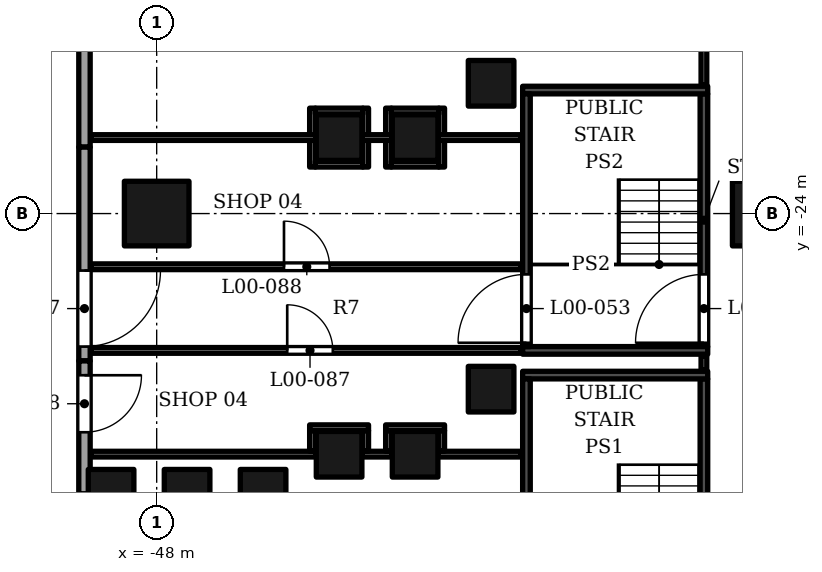
"""IFC4 building model, lengths in metres.
Left out: names, types, materials, properties, quantities, classifications, styles, units other than length and angle.
Written with IfcOpenShell. Run it as: python <this file> out.ifc"""

import sys

from ifc_helpers import new_model, si_unit, direction, frame, frame_2d, origin, origin_2d, place, context, subcontext, project, spatial, rectangle, extrude, element, fill, save


model = new_model("IFC4")
c1 = context("Model", 3, precision=1e-05, world=origin(), true_north=direction((0.0, 1.0)))
c2 = subcontext(c1, "Body", "Model", "MODEL_VIEW")
j1 = project(units=[si_unit("LENGTHUNIT", "METRE"), si_unit("PLANEANGLEUNIT", "RADIAN")], contexts=[c1])
p1 = place(None, origin())
s1 = spatial("IfcSite", under=j1, at=p1, CompositionType="ELEMENT")
p2 = place(p1, origin())
s2 = spatial("IfcBuilding", under=s1, at=p2, CompositionType="ELEMENT")
p3 = place(p2, origin())
s3 = spatial("IfcBuildingStorey", under=s2, at=p3, CompositionType="ELEMENT", Elevation=0.0)
for number, where, z_axis, x_axis in (
    (1, (-48.0, -24.0, 0.0), (0.0, 0.0, 1.0), (1.0, 0.0, 0.0)),
    (2, (-32.0, -24.0, 0.0), (0.0, 0.0, 1.0), (1.0, 0.0, 0.0)),
):
    element("IfcColumn", number, at=place(p3, frame(where, z_axis=z_axis, x_axis=x_axis)), inside=s3, PredefinedType="COLUMN", context=c2, shape_type="SweptSolid", body=[
        extrude(rectangle(XDim=1.7, YDim=1.7, at=origin_2d()), origin(), (0.0, 0.0, 1.0), 9.0),
    ])
for number, where, z_axis, x_axis in (
    (3, (-39.2, -28.62, 0.0), (0.0, 0.0, 1.0), (1.0, 0.0, 0.0)),
    (4, (-39.2, -20.572, 0.0), (0.0, 0.0, 1.0), (1.0, 0.0, 0.0)),
    (5, (-41.2, -30.333, 0.0), (0.0, 0.0, 1.0), (1.0, 0.0, 0.0)),
    (6, (-41.2, -22.001, 0.0), (0.0, 0.0, 1.0), (1.0, 0.0, 0.0)),
    (7, (-43.2, -30.333, 0.0), (0.0, 0.0, 1.0), (1.0, 0.0, 0.0)),
    (8, (-43.2, -22.001, 0.0), (0.0, 0.0, 1.0), (1.0, 0.0, 0.0)),
    (9, (-45.2, -31.333, 0.0), (0.0, 0.0, 1.0), (1.0, 0.0, 0.0)),
    (10, (-47.2, -31.333, 0.0), (0.0, 0.0, 1.0), (1.0, 0.0, 0.0)),
    (11, (-49.2, -31.333, 0.0), (0.0, 0.0, 1.0), (1.0, 0.0, 0.0)),
):
    element("IfcColumn", number, at=place(p3, frame(where, z_axis=z_axis, x_axis=x_axis)), inside=s3, PredefinedType="COLUMN", context=c2, shape_type="SweptSolid", body=[
        extrude(rectangle(XDim=1.2, YDim=1.2, at=origin_2d()), origin(), (0.0, 0.0, 1.0), 9.0),
    ])
p4 = place(p3, frame((-49.9, -13.702, 0.0), z_axis=(0.0, 0.0, 1.0), x_axis=(0.0, -1.0, 0.0)))
e12 = element("IfcWall", 12, at=p4, inside=s3, PredefinedType="ELEMENTEDWALL", context=c2, shape_type="SweptSolid", body=[
    extrude(rectangle(XDim=8.55, YDim=0.3, at=frame_2d((4.275, 0.0))), origin(), (0.0, 0.0, 1.0), 7.6),
])
p5 = place(p4, frame((2.302, 0.0, 0.0)))
e13 = element("IfcOpeningElement", 13, at=p5, cuts=e12, PredefinedType="OPENING", context=c2, shape_type="SweptSolid", body=[
    extrude(rectangle(XDim=3.0, YDim=2.7, at=frame_2d((1.5, 1.35))), frame((0.0, 0.16, 0.0), z_axis=(0.0, -1.0, 0.0), x_axis=(1.0, 0.0, 0.0)), (0.0, 0.0, 1.0), 0.32),
])
p6 = place(p3, frame((-49.9, -22.252, 0.0), z_axis=(0.0, 0.0, 1.0), x_axis=(0.0, -1.0, 0.0)))
e14 = element("IfcWall", 14, at=p6, inside=s3, PredefinedType="ELEMENTEDWALL", context=c2, shape_type="SweptSolid", body=[
    extrude(rectangle(XDim=5.625, YDim=0.3, at=frame_2d((2.812, 0.0))), origin(), (0.0, 0.0, 1.0), 7.6),
])
p7 = place(p6, frame((3.248, 0.0, 0.0)))
e15 = element("IfcOpeningElement", 15, at=p7, cuts=e14, PredefinedType="OPENING", context=c2, shape_type="SweptSolid", body=[
    extrude(rectangle(XDim=2.0, YDim=2.4, at=frame_2d((1.0, 1.2))), frame((0.0, 0.16, 0.0), z_axis=(0.0, -1.0, 0.0), x_axis=(1.0, 0.0, 0.0)), (0.0, 0.0, 1.0), 0.32),
])
p8 = place(p3, frame((-49.9, -27.877, 0.0), z_axis=(0.0, 0.0, 1.0), x_axis=(0.0, -1.0, 0.0)))
e16 = element("IfcWall", 16, at=p8, inside=s3, PredefinedType="ELEMENTEDWALL", context=c2, shape_type="SweptSolid", body=[
    extrude(rectangle(XDim=3.5, YDim=0.3, at=frame_2d((1.75, 0.0))), origin(), (0.0, 0.0, 1.0), 7.6),
])
p9 = place(p8, frame((0.377, 0.0, 0.0)))
e17 = element("IfcOpeningElement", 17, at=p9, cuts=e16, PredefinedType="OPENING", context=c2, shape_type="SweptSolid", body=[
    extrude(rectangle(XDim=1.5, YDim=2.7, at=frame_2d((0.75, 1.35))), frame((0.0, 0.16, 0.0), z_axis=(0.0, -1.0, 0.0), x_axis=(1.0, 0.0, 0.0)), (0.0, 0.0, 1.0), 0.32),
])
for number, where, z_axis, x_axis in (
    (18, (-49.85, -10.605, 9.0), (0.0, 0.0, 1.0), (0.0, -1.0, 0.0)),
    (19, (-49.85, -25.302, 9.0), (0.0, 0.0, 1.0), (0.0, -1.0, 0.0)),
):
    element("IfcWall", number, at=place(p3, frame(where, z_axis=z_axis, x_axis=x_axis)), inside=s3, PredefinedType="PARAPET", context=c2, shape_type="SweptSolid", body=[
        extrude(rectangle(XDim=14.698, YDim=0.3, at=frame_2d((7.349, 0.0))), origin(), (0.0, 0.0, 1.0), 1.1),
    ])
p10 = place(p3, frame((-38.37, -28.25, 0.0), z_axis=(0.0, 0.0, 1.0), x_axis=(1.0, 0.0, 0.0)))
e20 = element("IfcWall", 20, at=p10, inside=s3, PredefinedType="SOLIDWALL", context=c2, shape_type="SweptSolid", body=[
    extrude(rectangle(XDim=4.87, YDim=0.2, at=frame_2d((2.435, 0.0))), origin(), (0.0, 0.0, 1.0), 8.5),
])
p11 = place(p3, frame((-38.27, -35.0, 0.0), z_axis=(0.0, 0.0, 1.0), x_axis=(0.0, 1.0, 0.0)))
e21 = element("IfcWall", 21, at=p11, inside=s3, PredefinedType="SOLIDWALL", context=c2, shape_type="SweptSolid", body=[
    extrude(rectangle(XDim=6.65, YDim=0.2, at=frame_2d((3.325, 0.0))), origin(), (0.0, 0.0, 1.0), 8.5),
])
p12 = place(p11, frame((0.1, 0.0, 0.0)))
e22 = element("IfcOpeningElement", 22, at=p12, cuts=e21, PredefinedType="OPENING", context=c2, shape_type="SweptSolid", body=[
    extrude(rectangle(XDim=1.8, YDim=2.4, at=frame_2d((0.9, 1.2))), frame((0.0, 0.11, 0.0), z_axis=(0.0, -1.0, 0.0), x_axis=(1.0, 0.0, 0.0)), (0.0, 0.0, 1.0), 0.22),
])
p13 = place(p3, frame((-33.6, -35.0, 0.0), z_axis=(0.0, 0.0, 1.0), x_axis=(0.0, 1.0, 0.0)))
e23 = element("IfcWall", 23, at=p13, inside=s3, PredefinedType="SOLIDWALL", context=c2, shape_type="SweptSolid", body=[
    extrude(rectangle(XDim=6.65, YDim=0.2, at=frame_2d((3.325, 0.0))), origin(), (0.0, 0.0, 1.0), 8.5),
])
p14 = place(p13, frame((0.1, 0.0, 0.0)))
e24 = element("IfcOpeningElement", 24, at=p14, cuts=e23, PredefinedType="OPENING", context=c2, shape_type="SweptSolid", body=[
    extrude(rectangle(XDim=1.8, YDim=2.4, at=frame_2d((0.9, 1.2))), frame((0.0, 0.11, 0.0), z_axis=(0.0, -1.0, 0.0), x_axis=(1.0, 0.0, 0.0)), (0.0, 0.0, 1.0), 0.22),
])
for number, where, z_axis, x_axis in (
    (25, (-38.37, -27.6, 0.0), (0.0, 0.0, 1.0), (1.0, 0.0, 0.0)),
    (26, (-38.37, -20.75, 0.0), (0.0, 0.0, 1.0), (1.0, 0.0, 0.0)),
):
    element("IfcWall", number, at=place(p3, frame(where, z_axis=z_axis, x_axis=x_axis)), inside=s3, PredefinedType="SOLIDWALL", context=c2, shape_type="SweptSolid", body=[
        extrude(rectangle(XDim=4.87, YDim=0.2, at=frame_2d((2.435, 0.0))), origin(), (0.0, 0.0, 1.0), 8.5),
    ])
p15 = place(p3, frame((-38.27, -27.5, 0.0), z_axis=(0.0, 0.0, 1.0), x_axis=(0.0, 1.0, 0.0)))
e27 = element("IfcWall", 27, at=p15, inside=s3, PredefinedType="SOLIDWALL", context=c2, shape_type="SweptSolid", body=[
    extrude(rectangle(XDim=6.65, YDim=0.2, at=frame_2d((3.325, 0.0))), origin(), (0.0, 0.0, 1.0), 8.5),
])
p16 = place(p15, frame((0.1, 0.0, 0.0)))
e28 = element("IfcOpeningElement", 28, at=p16, cuts=e27, PredefinedType="OPENING", context=c2, shape_type="SweptSolid", body=[
    extrude(rectangle(XDim=1.8, YDim=2.4, at=frame_2d((0.9, 1.2))), frame((0.0, 0.11, 0.0), z_axis=(0.0, -1.0, 0.0), x_axis=(1.0, 0.0, 0.0)), (0.0, 0.0, 1.0), 0.22),
])
p17 = place(p3, frame((-33.6, -27.5, 0.0), z_axis=(0.0, 0.0, 1.0), x_axis=(0.0, 1.0, 0.0)))
e29 = element("IfcWall", 29, at=p17, inside=s3, PredefinedType="SOLIDWALL", context=c2, shape_type="SweptSolid", body=[
    extrude(rectangle(XDim=6.65, YDim=0.2, at=frame_2d((3.325, 0.0))), origin(), (0.0, 0.0, 1.0), 8.5),
])
p18 = place(p17, frame((0.1, 0.0, 0.0)))
e30 = element("IfcOpeningElement", 30, at=p18, cuts=e29, PredefinedType="OPENING", context=c2, shape_type="SweptSolid", body=[
    extrude(rectangle(XDim=1.8, YDim=2.4, at=frame_2d((0.9, 1.2))), frame((0.0, 0.11, 0.0), z_axis=(0.0, -1.0, 0.0), x_axis=(1.0, 0.0, 0.0)), (0.0, 0.0, 1.0), 0.22),
])
p19 = place(p3, frame((-49.72, -30.33, 0.0), z_axis=(0.0, 0.0, 1.0), x_axis=(1.0, 0.0, 0.0)))
e31 = element("IfcWall", 31, at=p19, inside=s3, PredefinedType="PARTITIONING", context=c2, shape_type="SweptSolid", body=[
    extrude(rectangle(XDim=5.92, YDim=0.15, at=frame_2d((2.96, 0.0))), origin(), (0.0, 0.0, 1.0), 7.6),
])
p20 = place(p3, frame((-42.6, -30.33, 0.0), z_axis=(0.0, 0.0, 1.0), x_axis=(1.0, 0.0, 0.0)))
e32 = element("IfcWall", 32, at=p20, inside=s3, PredefinedType="PARTITIONING", context=c2, shape_type="SweptSolid", body=[
    extrude(rectangle(XDim=0.8, YDim=0.15, at=frame_2d((0.4, 0.0))), origin(), (0.0, 0.0, 1.0), 8.5),
])
p21 = place(p3, frame((-40.6, -30.33, 0.0), z_axis=(0.0, 0.0, 1.0), x_axis=(1.0, 0.0, 0.0)))
e33 = element("IfcWall", 33, at=p21, inside=s3, PredefinedType="PARTITIONING", context=c2, shape_type="SweptSolid", body=[
    extrude(rectangle(XDim=2.19, YDim=0.15, at=frame_2d((1.095, 0.0))), origin(), (0.0, 0.0, 1.0), 8.5),
])
for number, where, z_axis, x_axis in (
    (34, (-43.9, -30.255, 0.0), (0.0, 0.0, 1.0), (0.0, 1.0, 0.0)),
    (35, (-42.5, -30.255, 0.0), (0.0, 0.0, 1.0), (0.0, 1.0, 0.0)),
    (36, (-41.9, -30.255, 0.0), (0.0, 0.0, 1.0), (0.0, 1.0, 0.0)),
    (37, (-40.5, -30.255, 0.0), (0.0, 0.0, 1.0), (0.0, 1.0, 0.0)),
):
    element("IfcWall", number, at=place(p3, frame(where, z_axis=z_axis, x_axis=x_axis)), inside=s3, PredefinedType="PARTITIONING", context=c2, shape_type="SweptSolid", body=[
        extrude(rectangle(XDim=0.545, YDim=0.15, at=frame_2d((0.272, 0.0))), origin(), (0.0, 0.0, 1.0), 8.5),
    ])
for number, where, z_axis, x_axis in (
    (38, (-43.975, -29.635, 0.0), (0.0, 0.0, 1.0), (1.0, 0.0, 0.0)),
    (39, (-41.975, -29.635, 0.0), (0.0, 0.0, 1.0), (1.0, 0.0, 0.0)),
):
    element("IfcWall", number, at=place(p3, frame(where, z_axis=z_axis, x_axis=x_axis)), inside=s3, PredefinedType="PARTITIONING", context=c2, shape_type="SweptSolid", body=[
        extrude(rectangle(XDim=1.55, YDim=0.15, at=frame_2d((0.775, 0.0))), origin(), (0.0, 0.0, 1.0), 8.5),
    ])
p22 = place(p3, frame((-33.6, -28.11, 0.0), z_axis=(0.0, 0.0, 1.0), x_axis=(0.0, 1.0, 0.0)))
e40 = element("IfcWall", 40, at=p22, inside=s3, PredefinedType="PARTITIONING", context=c2, shape_type="SweptSolid", body=[
    extrude(rectangle(XDim=0.37, YDim=0.15, at=frame_2d((0.185, 0.0))), origin(), (0.0, 0.0, 1.0), 8.5),
])
p23 = place(p3, frame((-49.72, -27.601, 0.0), z_axis=(0.0, 0.0, 1.0), x_axis=(1.0, 0.0, 0.0)))
e41 = element("IfcWall", 41, at=p23, inside=s3, PredefinedType="PARTITIONING", context=c2, shape_type="SweptSolid", body=[
    extrude(rectangle(XDim=11.31, YDim=0.151, at=frame_2d((5.655, 0.0))), origin(), (0.0, 0.0, 1.0), 7.6),
])
p24 = place(p23, frame((5.155, 0.0, 0.0)))
e42 = element("IfcOpeningElement", 42, at=p24, cuts=e41, PredefinedType="OPENING", context=c2, shape_type="SweptSolid", body=[
    extrude(rectangle(XDim=1.2, YDim=2.1, at=frame_2d((0.6, 1.05))), frame((0.0, 0.085, 0.0), z_axis=(0.0, -1.0, 0.0), x_axis=(1.0, 0.0, 0.0)), (0.0, 0.0, 1.0), 0.171),
])
p25 = place(p3, frame((-49.72, -25.399, 0.0), z_axis=(0.0, 0.0, 1.0), x_axis=(1.0, 0.0, 0.0)))
e43 = element("IfcWall", 43, at=p25, inside=s3, PredefinedType="PARTITIONING", context=c2, shape_type="SweptSolid", body=[
    extrude(rectangle(XDim=11.31, YDim=0.151, at=frame_2d((5.655, 0.0))), origin(), (0.0, 0.0, 1.0), 7.6),
])
p26 = place(p25, frame((5.07, 0.0, 0.0)))
e44 = element("IfcOpeningElement", 44, at=p26, cuts=e43, PredefinedType="OPENING", context=c2, shape_type="SweptSolid", body=[
    extrude(rectangle(XDim=1.2, YDim=2.1, at=frame_2d((0.6, 1.05))), frame((0.0, 0.085, 0.0), z_axis=(0.0, -1.0, 0.0), x_axis=(1.0, 0.0, 0.0)), (0.0, 0.0, 1.0), 0.171),
])
p27 = place(p3, frame((-43.9, -22.776, 0.0), z_axis=(0.0, 0.0, 1.0), x_axis=(0.0, 1.0, 0.0)))
e45 = element("IfcWall", 45, at=p27, inside=s3, PredefinedType="PARTITIONING", context=c2, shape_type="SweptSolid", body=[
    extrude(rectangle(XDim=1.55, YDim=0.15, at=frame_2d((0.775, 0.0))), origin(), (0.0, 0.0, 1.0), 8.5),
])
p28 = place(p3, frame((-43.825, -22.701, 0.0), z_axis=(0.0, 0.0, 1.0), x_axis=(1.0, 0.0, 0.0)))
e46 = element("IfcWall", 46, at=p28, inside=s3, PredefinedType="PARTITIONING", context=c2, shape_type="SweptSolid", body=[
    extrude(rectangle(XDim=1.25, YDim=0.15, at=frame_2d((0.625, 0.0))), origin(), (0.0, 0.0, 1.0), 8.5),
])
for number, where, z_axis, x_axis in (
    (47, (-42.5, -22.776, 0.0), (0.0, 0.0, 1.0), (0.0, 1.0, 0.0)),
    (48, (-41.9, -22.776, 0.0), (0.0, 0.0, 1.0), (0.0, 1.0, 0.0)),
):
    element("IfcWall", number, at=place(p3, frame(where, z_axis=z_axis, x_axis=x_axis)), inside=s3, PredefinedType="PARTITIONING", context=c2, shape_type="SweptSolid", body=[
        extrude(rectangle(XDim=1.55, YDim=0.15, at=frame_2d((0.775, 0.0))), origin(), (0.0, 0.0, 1.0), 8.5),
    ])
p29 = place(p3, frame((-41.825, -22.701, 0.0), z_axis=(0.0, 0.0, 1.0), x_axis=(1.0, 0.0, 0.0)))
e49 = element("IfcWall", 49, at=p29, inside=s3, PredefinedType="PARTITIONING", context=c2, shape_type="SweptSolid", body=[
    extrude(rectangle(XDim=1.25, YDim=0.15, at=frame_2d((0.625, 0.0))), origin(), (0.0, 0.0, 1.0), 8.5),
])
p30 = place(p3, frame((-40.5, -22.776, 0.0), z_axis=(0.0, 0.0, 1.0), x_axis=(0.0, 1.0, 0.0)))
e50 = element("IfcWall", 50, at=p30, inside=s3, PredefinedType="PARTITIONING", context=c2, shape_type="SweptSolid", body=[
    extrude(rectangle(XDim=1.55, YDim=0.15, at=frame_2d((0.775, 0.0))), origin(), (0.0, 0.0, 1.0), 8.5),
])
p31 = place(p3, frame((-49.72, -22.0, 0.0), z_axis=(0.0, 0.0, 1.0), x_axis=(1.0, 0.0, 0.0)))
e51 = element("IfcWall", 51, at=p31, inside=s3, PredefinedType="PARTITIONING", context=c2, shape_type="SweptSolid", body=[
    extrude(rectangle(XDim=5.92, YDim=0.15, at=frame_2d((2.96, 0.0))), origin(), (0.0, 0.0, 1.0), 7.6),
])
p32 = place(p3, frame((-42.6, -22.0, 0.0), z_axis=(0.0, 0.0, 1.0), x_axis=(1.0, 0.0, 0.0)))
e52 = element("IfcWall", 52, at=p32, inside=s3, PredefinedType="PARTITIONING", context=c2, shape_type="SweptSolid", body=[
    extrude(rectangle(XDim=0.8, YDim=0.15, at=frame_2d((0.4, 0.0))), origin(), (0.0, 0.0, 1.0), 8.5),
])
p33 = place(p3, frame((-40.6, -22.0, 0.0), z_axis=(0.0, 0.0, 1.0), x_axis=(1.0, 0.0, 0.0)))
e53 = element("IfcWall", 53, at=p33, inside=s3, PredefinedType="PARTITIONING", context=c2, shape_type="SweptSolid", body=[
    extrude(rectangle(XDim=2.19, YDim=0.15, at=frame_2d((1.095, 0.0))), origin(), (0.0, 0.0, 1.0), 8.5),
])
for number, where, z_axis, x_axis in (
    (54, (-43.825, -21.301, 0.0), (0.0, 0.0, 1.0), (1.0, 0.0, 0.0)),
    (55, (-41.825, -21.301, 0.0), (0.0, 0.0, 1.0), (1.0, 0.0, 0.0)),
):
    element("IfcWall", number, at=place(p3, frame(where, z_axis=z_axis, x_axis=x_axis)), inside=s3, PredefinedType="PARTITIONING", context=c2, shape_type="SweptSolid", body=[
        extrude(rectangle(XDim=1.25, YDim=0.15, at=frame_2d((0.625, 0.0))), origin(), (0.0, 0.0, 1.0), 8.5),
    ])
p34 = place(p3, frame((-33.6, -20.61, 0.0), z_axis=(0.0, 0.0, 1.0), x_axis=(0.0, 1.0, 0.0)))
e56 = element("IfcWall", 56, at=p34, inside=s3, PredefinedType="PARTITIONING", context=c2, shape_type="SweptSolid", body=[
    extrude(rectangle(XDim=8.97, YDim=0.15, at=frame_2d((4.485, 0.0))), origin(), (0.0, 0.0, 1.0), 8.5),
])
p35 = place(p34, frame((2.711, 0.0, 0.0)))
e57 = element("IfcOpeningElement", 57, at=p35, cuts=e56, PredefinedType="OPENING", context=c2, shape_type="SweptSolid", body=[
    extrude(rectangle(XDim=1.2, YDim=2.1, at=frame_2d((0.6, 1.05))), frame((0.0, 0.085, 0.0), z_axis=(0.0, -1.0, 0.0), x_axis=(1.0, 0.0, 0.0)), (0.0, 0.0, 1.0), 0.17),
])
p36 = place(p7, origin())
e58 = element("IfcDoor", 58, at=p36, inside=s3, OperationType="DOUBLE_DOOR_SINGLE_SWING", PredefinedType="DOOR", context=c2, shape_type="SweptSolid", body=[
    extrude(rectangle(XDim=2.0, YDim=2.4, at=frame_2d((1.0, 1.2))), frame((0.0, 0.025, 0.0), z_axis=(0.0, -1.0, 0.0), x_axis=(1.0, 0.0, 0.0)), (0.0, 0.0, 1.0), 0.05),
])
fill(e15, e58)
p37 = place(p9, origin())
e59 = element("IfcDoor", 59, at=p37, inside=s3, OperationType="DOUBLE_DOOR_SINGLE_SWING", PredefinedType="DOOR", context=c2, shape_type="SweptSolid", body=[
    extrude(rectangle(XDim=1.5, YDim=2.7, at=frame_2d((0.75, 1.35))), frame((0.0, 0.025, 0.0), z_axis=(0.0, -1.0, 0.0), x_axis=(1.0, 0.0, 0.0)), (0.0, 0.0, 1.0), 0.05),
])
fill(e17, e59)
p38 = place(p18, origin())
e60 = element("IfcDoor", 60, at=p38, inside=s3, OperationType="DOUBLE_DOOR_SINGLE_SWING", PredefinedType="DOOR", context=c2, shape_type="SweptSolid", body=[
    extrude(rectangle(XDim=1.8, YDim=2.4, at=frame_2d((0.9, 1.2))), frame((0.0, 0.025, 0.0), z_axis=(0.0, -1.0, 0.0), x_axis=(1.0, 0.0, 0.0)), (0.0, 0.0, 1.0), 0.05),
])
fill(e30, e60)
p39 = place(p16, origin())
e61 = element("IfcDoor", 61, at=p39, inside=s3, OperationType="DOUBLE_DOOR_SINGLE_SWING", PredefinedType="DOOR", context=c2, shape_type="SweptSolid", body=[
    extrude(rectangle(XDim=1.8, YDim=2.4, at=frame_2d((0.9, 1.2))), frame((0.0, 0.025, 0.0), z_axis=(0.0, -1.0, 0.0), x_axis=(1.0, 0.0, 0.0)), (0.0, 0.0, 1.0), 0.05),
])
fill(e28, e61)
p40 = place(p24, origin())
e62 = element("IfcDoor", 62, at=p40, inside=s3, OperationType="SINGLE_SWING_LEFT", PredefinedType="DOOR", context=c2, shape_type="SweptSolid", body=[
    extrude(rectangle(XDim=1.2, YDim=2.1, at=frame_2d((0.6, 1.05))), frame((0.0, 0.025, 0.0), z_axis=(0.0, -1.0, 0.0), x_axis=(1.0, 0.0, 0.0)), (0.0, 0.0, 1.0), 0.05),
])
fill(e42, e62)
p41 = place(p26, origin())
e63 = element("IfcDoor", 63, at=p41, inside=s3, OperationType="SINGLE_SWING_LEFT", PredefinedType="DOOR", context=c2, shape_type="SweptSolid", body=[
    extrude(rectangle(XDim=1.2, YDim=2.1, at=frame_2d((0.6, 1.05))), frame((0.0, 0.025, 0.0), z_axis=(0.0, -1.0, 0.0), x_axis=(1.0, 0.0, 0.0)), (0.0, 0.0, 1.0), 0.05),
])
fill(e44, e63)
save(model, sys.argv[1])
